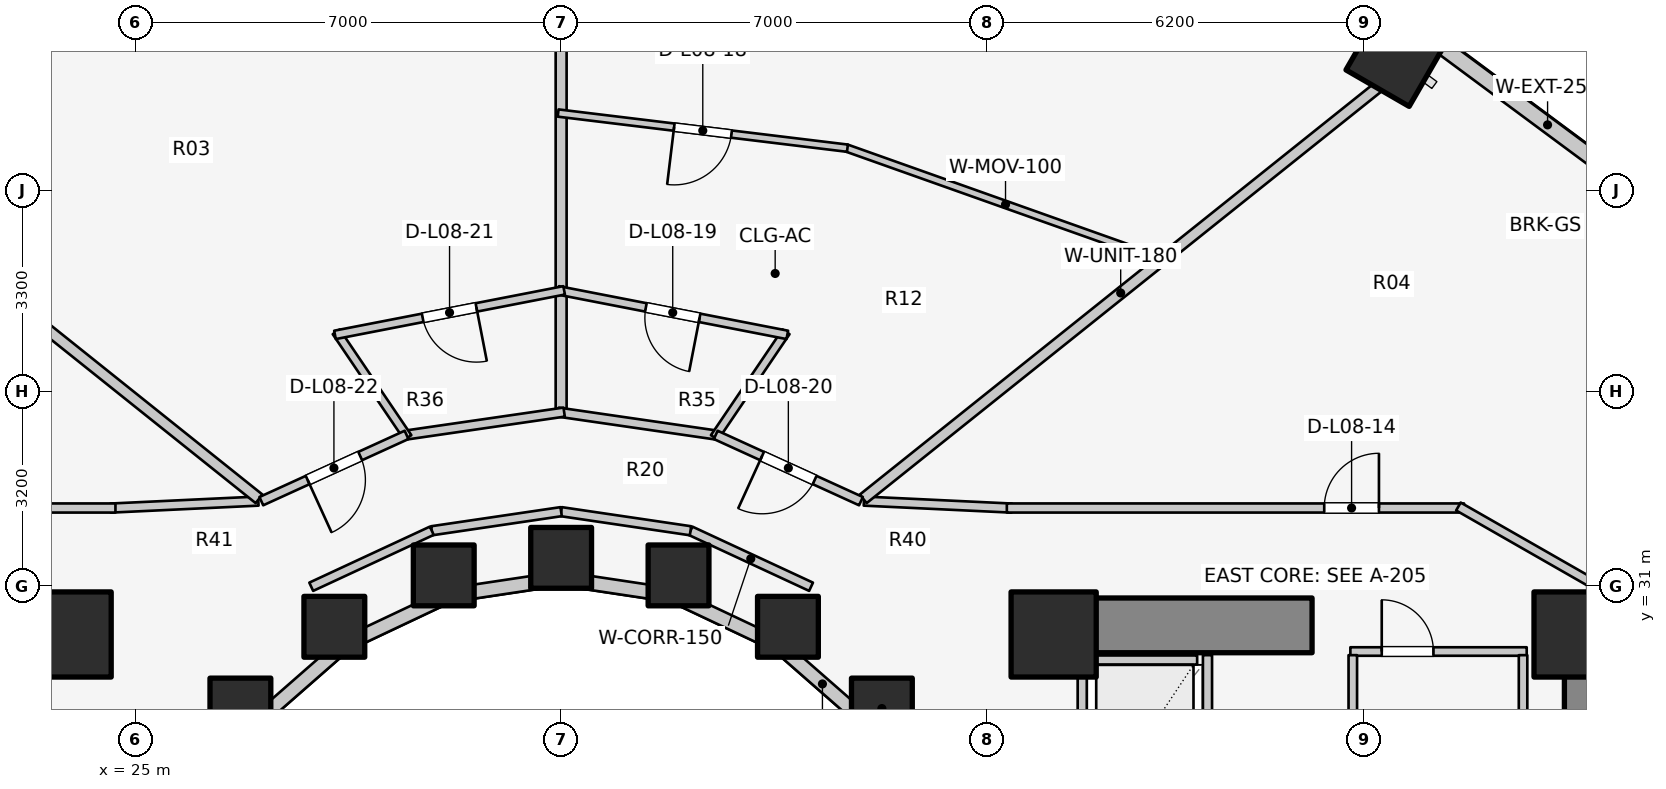
"""IFC4 building model, lengths in metres.
Left out: names, types, materials, properties, quantities, classifications, styles, units other than length and angle.
Written with IfcOpenShell. Run it as: python <this file> out.ifc"""

import sys

from ifc_helpers import new_model, si_unit, direction, frame, frame_2d, origin, origin_2d, place, context, subcontext, project, spatial, rectangle, extrude, element, fill, save


model = new_model("IFC4")
c1 = context("Model", 3, precision=1e-05, world=origin(), true_north=direction((0.0, 1.0)))
c2 = subcontext(c1, "Body", "Model", "MODEL_VIEW")
j1 = project(units=[si_unit("LENGTHUNIT", "METRE"), si_unit("PLANEANGLEUNIT", "RADIAN")], contexts=[c1])
p1 = place(None, origin())
s1 = spatial("IfcSite", under=j1, at=p1, CompositionType="ELEMENT")
p2 = place(p1, origin())
s2 = spatial("IfcBuilding", under=s1, at=p2, CompositionType="ELEMENT")
p3 = place(p2, frame((0.0, 0.0, 30.7)))
s3 = spatial("IfcBuildingStorey", under=s2, at=p3, CompositionType="ELEMENT", Elevation=30.7)
p4 = place(p3, frame((19.65, 30.35, 0.0), z_axis=(0.0, 0.0, 1.0), x_axis=(1.0, 0.0, 0.0)))
e1 = element("IfcWall", 1, at=p4, inside=s3, PredefinedType="SHEAR", context=c2, shape_type="SweptSolid", body=[
    extrude(rectangle(XDim=4.5, YDim=0.9, at=frame_2d((2.25, 0.0))), origin(), (0.0, 0.0, 1.0), 3.1),
])
p5 = place(p3, frame((48.95, 17.05, 0.0), z_axis=(0.0, 0.0, 1.0), x_axis=(0.0, 1.0, 0.0)))
e2 = element("IfcWall", 2, at=p5, inside=s3, PredefinedType="SHEAR", context=c2, shape_type="SweptSolid", body=[
    extrude(rectangle(XDim=12.8, YDim=0.9, at=frame_2d((6.4, 0.0))), origin(), (0.0, 0.0, 1.0), 3.1),
])
p6 = place(p3, frame((39.85, 30.35, 0.0), z_axis=(0.0, 0.0, 1.0), x_axis=(1.0, 0.0, 0.0)))
e3 = element("IfcWall", 3, at=p6, inside=s3, PredefinedType="SHEAR", context=c2, shape_type="SweptSolid", body=[
    extrude(rectangle(XDim=4.5, YDim=0.9, at=frame_2d((2.25, 0.0))), origin(), (0.0, 0.0, 1.0), 3.1),
])
for number, where, z_axis, x_axis in (
    (4, (23.9, 30.2, 0.0), (0.0, 0.0, 1.0), (1.0, 0.0, 0.0)),
    (5, (48.7, 30.2, 0.0), (0.0, 0.0, 1.0), (1.0, 0.0, 0.0)),
    (6, (40.1, 30.2, 0.0), (0.0, 0.0, 1.0), (1.0, 0.0, 0.0)),
):
    element("IfcColumn", number, at=place(p3, frame(where, z_axis=z_axis, x_axis=x_axis)), inside=s3, PredefinedType="COLUMN", context=c2, shape_type="SweptSolid", body=[
        extrude(rectangle(XDim=1.4, YDim=1.4, at=origin_2d()), origin(), (0.0, 0.0, 1.0), 3.1),
    ])
for number, where, z_axis, x_axis in (
    (7, (37.275, 28.982, 0.0), (0.0, 0.0, 1.0), (1.0, 0.0, 0.0)),
    (8, (35.73, 30.327, 0.0), (0.0, 0.0, 1.0), (1.0, 0.0, 0.0)),
):
    element("IfcColumn", number, at=place(p3, frame(where, z_axis=z_axis, x_axis=x_axis)), inside=s3, PredefinedType="COLUMN", context=c2, shape_type="SweptSolid", body=[
        extrude(rectangle(XDim=1.0, YDim=1.0, at=origin_2d()), origin(), (0.0, 0.0, 1.0), 3.1),
    ])
p7 = place(p3, frame((45.727, 39.704, 0.0), z_axis=(0.0, 0.0, 1.0), x_axis=(0.5, 0.866025403784, 0.0)))
e9 = element("IfcColumn", 9, at=p7, inside=s3, PredefinedType="COLUMN", context=c2, shape_type="SweptSolid", body=[
    extrude(rectangle(XDim=1.2, YDim=1.2, at=origin_2d()), origin(), (0.0, 0.0, 1.0), 3.1),
])
for number, where, z_axis, x_axis in (
    (10, (33.931, 31.172, 0.0), (0.0, 0.0, 1.0), (1.0, 0.0, 0.0)),
    (11, (32.0, 31.46, 0.0), (0.0, 0.0, 1.0), (1.0, 0.0, 0.0)),
    (12, (30.069, 31.172, 0.0), (0.0, 0.0, 1.0), (1.0, 0.0, 0.0)),
    (13, (28.27, 30.327, 0.0), (0.0, 0.0, 1.0), (1.0, 0.0, 0.0)),
    (14, (26.725, 28.982, 0.0), (0.0, 0.0, 1.0), (1.0, 0.0, 0.0)),
):
    element("IfcColumn", number, at=place(p3, frame(where, z_axis=z_axis, x_axis=x_axis)), inside=s3, PredefinedType="COLUMN", context=c2, shape_type="SweptSolid", body=[
        extrude(rectangle(XDim=1.0, YDim=1.0, at=origin_2d()), origin(), (0.0, 0.0, 1.0), 3.1),
    ])
p8 = place(p3, frame((37.035, 28.742, 0.0), z_axis=(0.0, 0.0, 1.0), x_axis=(-0.752576694707, 0.658504607869, 0.0)))
e15 = element("IfcWall", 15, at=p8, inside=s3, PredefinedType="STANDARD", context=c2, shape_type="SweptSolid", body=[
    extrude(rectangle(XDim=1.959, YDim=0.23, at=frame_2d((0.98, 0.0))), origin(), (0.0, 0.0, 1.0), 2.16),
])
p9 = place(p3, frame((35.56, 30.032, 0.0), z_axis=(0.0, 0.0, 1.0), x_axis=(-0.904179699603, 0.427152280606, 0.0)))
e16 = element("IfcWall", 16, at=p9, inside=s3, PredefinedType="STANDARD", context=c2, shape_type="SweptSolid", body=[
    extrude(rectangle(XDim=1.899, YDim=0.23, at=frame_2d((0.95, 0.0))), origin(), (0.0, 0.0, 1.0), 2.16),
])
for number, where, z_axis, x_axis in (
    (17, (33.843, 30.843, 0.0), (0.0, 0.0, 1.0), (-0.989, 0.149, 0.0)),
    (18, (32.0, 31.12, 0.0), (0.0, 0.0, 1.0), (-0.989, -0.149, 0.0)),
):
    element("IfcWall", number, at=place(p3, frame(where, z_axis=z_axis, x_axis=x_axis)), inside=s3, PredefinedType="STANDARD", context=c2, shape_type="SweptSolid", body=[
        extrude(rectangle(XDim=1.864, YDim=0.23, at=frame_2d((0.932, 0.0))), origin(), (0.0, 0.0, 1.0), 2.16),
    ])
p10 = place(p3, frame((30.157, 30.843, 0.0), z_axis=(0.0, 0.0, 1.0), x_axis=(-0.904179699603, -0.427152280606, 0.0)))
e19 = element("IfcWall", 19, at=p10, inside=s3, PredefinedType="STANDARD", context=c2, shape_type="SweptSolid", body=[
    extrude(rectangle(XDim=1.899, YDim=0.23, at=frame_2d((0.95, 0.0))), origin(), (0.0, 0.0, 1.0), 2.16),
])
p11 = place(p3, frame((28.44, 30.032, 0.0), z_axis=(0.0, 0.0, 1.0), x_axis=(-0.752576694707, -0.658504607869, 0.0)))
e20 = element("IfcWall", 20, at=p11, inside=s3, PredefinedType="STANDARD", context=c2, shape_type="SweptSolid", body=[
    extrude(rectangle(XDim=1.959, YDim=0.23, at=frame_2d((0.98, 0.0))), origin(), (0.0, 0.0, 1.0), 2.16),
])
p12 = place(p3, frame((50.405, 36.965, 0.0), z_axis=(0.0, 0.0, 1.0), x_axis=(-0.803477531792, 0.595335078679, 0.0)))
e21 = element("IfcWall", 21, at=p12, inside=s3, PredefinedType="STANDARD", context=c2, shape_type="SweptSolid", body=[
    extrude(rectangle(XDim=5.43, YDim=0.26, at=frame_2d((2.715, 0.0))), origin(), (0.0, 0.0, 1.0), 2.85),
])
p13 = place(p3, frame((40.74, 29.78, 0.0), z_axis=(0.0, 0.0, 1.0), x_axis=(1.0, 0.0, 0.0)))
e22 = element("IfcWall", 22, at=p13, inside=s3, PredefinedType="SOLIDWALL", context=c2, shape_type="SweptSolid", body=[
    extrude(rectangle(XDim=1.72, YDim=0.15, at=frame_2d((0.86, 0.0))), origin(), (0.0, 0.0, 1.0), 2.855),
])
for number, where, z_axis, x_axis in (
    (23, (40.57, 27.14, 0.0), (0.0, 0.0, 1.0), (0.0, 1.0, 0.0)),
    (24, (42.63, 27.14, 0.0), (0.0, 0.0, 1.0), (0.0, 1.0, 0.0)),
):
    element("IfcWall", number, at=place(p3, frame(where, z_axis=z_axis, x_axis=x_axis)), inside=s3, PredefinedType="SOLIDWALL", context=c2, shape_type="SweptSolid", body=[
        extrude(rectangle(XDim=2.72, YDim=0.15, at=frame_2d((1.36, 0.0))), origin(), (0.0, 0.0, 1.0), 2.855),
    ])
p14 = place(p3, frame((44.98, 29.92, 0.0), z_axis=(0.0, 0.0, 1.0), x_axis=(1.0, 0.0, 0.0)))
e25 = element("IfcWall", 25, at=p14, inside=s3, PredefinedType="PLUMBINGWALL", context=c2, shape_type="SweptSolid", body=[
    extrude(rectangle(XDim=2.9, YDim=0.14, at=frame_2d((1.45, 0.0))), origin(), (0.0, 0.0, 1.0), 2.855),
])
p15 = place(p14, frame((0.516, 0.0, 0.0)))
e26 = element("IfcOpeningElement", 26, at=p15, cuts=e25, PredefinedType="OPENING", context=c2, shape_type="SweptSolid", body=[
    extrude(rectangle(XDim=0.85, YDim=2.05, at=frame_2d((0.425, 1.025))), frame((0.0, 0.08, 0.0), z_axis=(0.0, -1.0, 0.0), x_axis=(1.0, 0.0, 0.0)), (0.0, 0.0, 1.0), 0.16),
])
for number, where, z_axis, x_axis in (
    (27, (45.02, 25.98, 0.0), (0.0, 0.0, 1.0), (0.0, 1.0, 0.0)),
    (28, (47.82, 25.98, 0.0), (0.0, 0.0, 1.0), (0.0, 1.0, 0.0)),
):
    element("IfcWall", number, at=place(p3, frame(where, z_axis=z_axis, x_axis=x_axis)), inside=s3, PredefinedType="PLUMBINGWALL", context=c2, shape_type="SweptSolid", body=[
        extrude(rectangle(XDim=3.88, YDim=0.14, at=frame_2d((1.94, 0.0))), origin(), (0.0, 0.0, 1.0), 2.855),
    ])
p16 = place(p3, frame((36.11, 30.985, 0.0), z_axis=(0.0, 0.0, 1.0), x_axis=(-0.906943449489, 0.421252393975, 0.0)))
e29 = element("IfcWall", 29, at=p16, inside=s3, PredefinedType="PARTITIONING", context=c2, shape_type="SweptSolid", body=[
    extrude(rectangle(XDim=2.186, YDim=0.15, at=frame_2d((1.093, 0.0))), origin(), (0.0, 0.0, 1.0), 2.237),
])
for number, where, z_axis, x_axis in (
    (30, (34.127, 31.906, 0.0), (0.0, 0.0, 1.0), (-0.989, 0.146, 0.0)),
    (31, (32.0, 32.22, 0.0), (0.0, 0.0, 1.0), (-0.989, -0.146, 0.0)),
):
    element("IfcWall", number, at=place(p3, frame(where, z_axis=z_axis, x_axis=x_axis)), inside=s3, PredefinedType="PARTITIONING", context=c2, shape_type="SweptSolid", body=[
        extrude(rectangle(XDim=2.151, YDim=0.15, at=frame_2d((1.075, 0.0))), origin(), (0.0, 0.0, 1.0), 2.237),
    ])
p17 = place(p3, frame((29.873, 31.906, 0.0), z_axis=(0.0, 0.0, 1.0), x_axis=(-0.906943449489, -0.421252393975, 0.0)))
e32 = element("IfcWall", 32, at=p17, inside=s3, PredefinedType="PARTITIONING", context=c2, shape_type="SweptSolid", body=[
    extrude(rectangle(XDim=2.186, YDim=0.15, at=frame_2d((1.093, 0.0))), origin(), (0.0, 0.0, 1.0), 2.237),
])
p18 = place(p3, frame((36.98, 32.394, 0.0), z_axis=(0.0, 0.0, 1.0), x_axis=(0.998877427952, -0.047369651964, 0.0)))
e33 = element("IfcWall", 33, at=p18, inside=s3, PredefinedType="PARTITIONING", context=c2, shape_type="SweptSolid", body=[
    extrude(rectangle(XDim=2.433, YDim=0.15, at=frame_2d((1.216, 0.0))), origin(), (0.0, 0.0, 1.0), 2.237),
])
p19 = place(p3, frame((39.33, 32.28, 0.0), z_axis=(0.0, 0.0, 1.0), x_axis=(1.0, 0.0, 0.0)))
e34 = element("IfcWall", 34, at=p19, inside=s3, PredefinedType="PARTITIONING", context=c2, shape_type="SweptSolid", body=[
    extrude(rectangle(XDim=7.52, YDim=0.15, at=frame_2d((3.76, 0.0))), origin(), (0.0, 0.0, 1.0), 2.237),
])
p20 = place(p19, frame((5.22, 0.0, 0.0)))
e35 = element("IfcOpeningElement", 35, at=p20, cuts=e34, PredefinedType="OPENING", context=c2, shape_type="SweptSolid", body=[
    extrude(rectangle(XDim=0.9, YDim=2.1, at=frame_2d((0.45, 1.05))), frame((0.0, 0.085, 0.0), z_axis=(0.0, -1.0, 0.0), x_axis=(1.0, 0.0, 0.0)), (0.0, 0.0, 1.0), 0.17),
])
p21 = place(p3, frame((46.757, 32.305, 0.0), z_axis=(0.0, 0.0, 1.0), x_axis=(0.867991349648, -0.496579315857, 0.0)))
e36 = element("IfcWall", 36, at=p21, inside=s3, PredefinedType="PARTITIONING", context=c2, shape_type="SweptSolid", body=[
    extrude(rectangle(XDim=2.567, YDim=0.15, at=frame_2d((1.283, 0.0))), origin(), (0.0, 0.0, 1.0), 2.069),
])
p22 = place(p3, frame((27.02, 32.394, 0.0), z_axis=(0.0, 0.0, 1.0), x_axis=(-0.998877427952, -0.047369651964, 0.0)))
e37 = element("IfcWall", 37, at=p22, inside=s3, PredefinedType="PARTITIONING", context=c2, shape_type="SweptSolid", body=[
    extrude(rectangle(XDim=2.433, YDim=0.15, at=frame_2d((1.216, 0.0))), origin(), (0.0, 0.0, 1.0), 2.237),
])
p23 = place(p3, frame((17.15, 32.28, 0.0), z_axis=(0.0, 0.0, 1.0), x_axis=(1.0, 0.0, 0.0)))
e38 = element("IfcWall", 38, at=p23, inside=s3, PredefinedType="PARTITIONING", context=c2, shape_type="SweptSolid", body=[
    extrude(rectangle(XDim=7.52, YDim=0.15, at=frame_2d((3.76, 0.0))), origin(), (0.0, 0.0, 1.0), 2.237),
])
p24 = place(p23, frame((1.3, 0.0, 0.0)))
e39 = element("IfcOpeningElement", 39, at=p24, cuts=e38, PredefinedType="OPENING", context=c2, shape_type="SweptSolid", body=[
    extrude(rectangle(XDim=0.9, YDim=2.1, at=frame_2d((0.45, 1.05))), frame((0.0, 0.085, 0.0), z_axis=(0.0, -1.0, 0.0), x_axis=(1.0, 0.0, 0.0)), (0.0, 0.0, 1.0), 0.17),
])
p25 = place(p3, frame((36.968, 32.431, 0.0), z_axis=(0.0, 0.0, 1.0), x_axis=(0.781055486744, 0.624461629428, 0.0)))
e40 = element("IfcWall", 40, at=p25, inside=s3, PredefinedType="PARTITIONING", context=c2, shape_type="SweptSolid", body=[
    extrude(rectangle(XDim=10.843, YDim=0.18, at=frame_2d((5.422, 0.0))), origin(), (0.0, 0.0, 1.0), 2.237),
])
p26 = place(p3, frame((32.0, 33.905, 0.0), z_axis=(0.0, 0.0, 1.0), x_axis=(0.0, 1.0, 0.0)))
e41 = element("IfcWall", 41, at=p26, inside=s3, PredefinedType="PARTITIONING", context=c2, shape_type="SweptSolid", body=[
    extrude(rectangle(XDim=8.395, YDim=0.18, at=frame_2d((4.198, 0.0))), origin(), (0.0, 0.0, 1.0), 2.237),
])
p27 = place(p3, frame((27.032, 32.431, 0.0), z_axis=(0.0, 0.0, 1.0), x_axis=(-0.781055486744, 0.624461629428, 0.0)))
e42 = element("IfcWall", 42, at=p27, inside=s3, PredefinedType="PARTITIONING", context=c2, shape_type="SweptSolid", body=[
    extrude(rectangle(XDim=10.843, YDim=0.18, at=frame_2d((5.422, 0.0))), origin(), (0.0, 0.0, 1.0), 2.237),
])
p28 = place(p3, frame((41.928, 36.342, 0.0), z_axis=(0.0, 0.0, 1.0), x_axis=(-0.942369240096, 0.334574678243, 0.0)))
e43 = element("IfcWall", 43, at=p28, inside=s3, PredefinedType="MOVABLE", context=c2, shape_type="SweptSolid", body=[
    extrude(rectangle(XDim=5.559, YDim=0.12, at=frame_2d((2.779, 0.0))), origin(), (0.0, 0.0, 1.0), 2.237),
])
p29 = place(p3, frame((36.708, 38.197, 0.0), z_axis=(0.0, 0.0, 1.0), x_axis=(-0.992699076447, 0.120617343785, 0.0)))
e44 = element("IfcWall", 44, at=p29, inside=s3, PredefinedType="MOVABLE", context=c2, shape_type="SweptSolid", body=[
    extrude(rectangle(XDim=4.793, YDim=0.12, at=frame_2d((2.396, 0.0))), origin(), (0.0, 0.0, 1.0), 2.237),
])
p30 = place(p29, frame((1.922, 0.0, 0.0)))
e45 = element("IfcOpeningElement", 45, at=p30, cuts=e44, PredefinedType="OPENING", context=c2, shape_type="SweptSolid", body=[
    extrude(rectangle(XDim=0.95, YDim=2.1, at=frame_2d((0.475, 1.05))), frame((0.0, 0.07, 0.0), z_axis=(0.0, -1.0, 0.0), x_axis=(1.0, 0.0, 0.0)), (0.0, 0.0, 1.0), 0.14),
])
p31 = place(p3, frame((34.599, 33.473, 0.0), z_axis=(0.0, 0.0, 1.0), x_axis=(-0.989649898776, 0.143502884474, 0.0)))
e46 = element("IfcWall", 46, at=p31, inside=s3, PredefinedType="PARTITIONING", context=c2, shape_type="SweptSolid", body=[
    extrude(rectangle(XDim=2.676, YDim=0.15, at=frame_2d((1.338, 0.0))), origin(), (0.0, 0.0, 1.0), 2.237),
])
p32 = place(p3, frame((34.521, 33.439, 0.0), z_axis=(0.0, 0.0, 1.0), x_axis=(0.56056273171, 0.828111963335, 0.0)))
e47 = element("IfcWall", 47, at=p32, inside=s3, PredefinedType="PLUMBINGWALL", context=c2, shape_type="SweptSolid", body=[
    extrude(rectangle(XDim=2.1, YDim=0.14, at=frame_2d((1.05, 0.0))), origin(), (0.0, 0.0, 1.0), 2.855),
])
p33 = place(p3, frame((35.72, 35.127, 0.0), z_axis=(0.0, 0.0, 1.0), x_axis=(-0.981623000654, 0.190830512727, 0.0)))
e48 = element("IfcWall", 48, at=p33, inside=s3, PredefinedType="PLUMBINGWALL", context=c2, shape_type="SweptSolid", body=[
    extrude(rectangle(XDim=3.839, YDim=0.14, at=frame_2d((1.92, 0.0))), origin(), (0.0, 0.0, 1.0), 2.237),
])
p34 = place(p33, frame((1.47, 0.0, 0.0)))
e49 = element("IfcOpeningElement", 49, at=p34, cuts=e48, PredefinedType="OPENING", context=c2, shape_type="SweptSolid", body=[
    extrude(rectangle(XDim=0.9, YDim=2.1, at=frame_2d((0.45, 1.05))), frame((0.0, 0.08, 0.0), z_axis=(0.0, -1.0, 0.0), x_axis=(1.0, 0.0, 0.0)), (0.0, 0.0, 1.0), 0.16),
])
p35 = place(p3, frame((36.931, 32.393, 0.0), z_axis=(0.0, 0.0, 1.0), x_axis=(-0.909747571199, 0.415161843982, 0.0)))
e50 = element("IfcWall", 50, at=p35, inside=s3, PredefinedType="PARTITIONING", context=c2, shape_type="SweptSolid", body=[
    extrude(rectangle(XDim=2.625, YDim=0.15, at=frame_2d((1.312, 0.0))), origin(), (0.0, 0.0, 1.0), 2.237),
])
p36 = place(p35, frame((0.838, 0.0, 0.0)))
e51 = element("IfcOpeningElement", 51, at=p36, cuts=e50, PredefinedType="OPENING", context=c2, shape_type="SweptSolid", body=[
    extrude(rectangle(XDim=0.95, YDim=2.1, at=frame_2d((0.475, 1.05))), frame((0.0, 0.085, 0.0), z_axis=(0.0, -1.0, 0.0), x_axis=(1.0, 0.0, 0.0)), (0.0, 0.0, 1.0), 0.17),
])
p37 = place(p3, frame((32.05, 33.857, 0.0), z_axis=(0.0, 0.0, 1.0), x_axis=(-0.989649898776, -0.143502884474, 0.0)))
e52 = element("IfcWall", 52, at=p37, inside=s3, PredefinedType="PARTITIONING", context=c2, shape_type="SweptSolid", body=[
    extrude(rectangle(XDim=2.676, YDim=0.15, at=frame_2d((1.338, 0.0))), origin(), (0.0, 0.0, 1.0), 2.237),
])
p38 = place(p3, frame((29.479, 33.439, 0.0), z_axis=(0.0, 0.0, 1.0), x_axis=(-0.56056273171, 0.828111963335, 0.0)))
e53 = element("IfcWall", 53, at=p38, inside=s3, PredefinedType="PLUMBINGWALL", context=c2, shape_type="SweptSolid", body=[
    extrude(rectangle(XDim=2.1, YDim=0.14, at=frame_2d((1.05, 0.0))), origin(), (0.0, 0.0, 1.0), 2.855),
])
p39 = place(p3, frame((32.049, 35.86, 0.0), z_axis=(0.0, 0.0, 1.0), x_axis=(-0.981623000654, -0.190830512727, 0.0)))
e54 = element("IfcWall", 54, at=p39, inside=s3, PredefinedType="PLUMBINGWALL", context=c2, shape_type="SweptSolid", body=[
    extrude(rectangle(XDim=3.839, YDim=0.14, at=frame_2d((1.92, 0.0))), origin(), (0.0, 0.0, 1.0), 2.237),
])
p40 = place(p39, frame((1.47, 0.0, 0.0)))
e55 = element("IfcOpeningElement", 55, at=p40, cuts=e54, PredefinedType="OPENING", context=c2, shape_type="SweptSolid", body=[
    extrude(rectangle(XDim=0.9, YDim=2.1, at=frame_2d((0.45, 1.05))), frame((0.0, 0.08, 0.0), z_axis=(0.0, -1.0, 0.0), x_axis=(1.0, 0.0, 0.0)), (0.0, 0.0, 1.0), 0.16),
])
p41 = place(p3, frame((29.457, 33.482, 0.0), z_axis=(0.0, 0.0, 1.0), x_axis=(-0.909747571199, -0.415161843982, 0.0)))
e56 = element("IfcWall", 56, at=p41, inside=s3, PredefinedType="PARTITIONING", context=c2, shape_type="SweptSolid", body=[
    extrude(rectangle(XDim=2.625, YDim=0.15, at=frame_2d((1.312, 0.0))), origin(), (0.0, 0.0, 1.0), 2.237),
])
p42 = place(p41, frame((0.838, 0.0, 0.0)))
e57 = element("IfcOpeningElement", 57, at=p42, cuts=e56, PredefinedType="OPENING", context=c2, shape_type="SweptSolid", body=[
    extrude(rectangle(XDim=0.95, YDim=2.1, at=frame_2d((0.475, 1.05))), frame((0.0, 0.085, 0.0), z_axis=(0.0, -1.0, 0.0), x_axis=(1.0, 0.0, 0.0)), (0.0, 0.0, 1.0), 0.17),
])
p43 = place(p15, origin())
e58 = element("IfcDoor", 58, at=p43, inside=s3, OperationType="SINGLE_SWING_LEFT", PredefinedType="DOOR", context=c2, shape_type="SweptSolid", body=[
    extrude(rectangle(XDim=0.85, YDim=2.05, at=frame_2d((0.425, 1.025))), frame((0.0, 0.025, 0.0), z_axis=(0.0, -1.0, 0.0), x_axis=(1.0, 0.0, 0.0)), (0.0, 0.0, 1.0), 0.05),
])
fill(e26, e58)
p44 = place(p20, origin())
e59 = element("IfcDoor", 59, at=p44, inside=s3, OperationType="SINGLE_SWING_RIGHT", PredefinedType="DOOR", context=c2, shape_type="SweptSolid", body=[
    extrude(rectangle(XDim=0.9, YDim=2.1, at=frame_2d((0.45, 1.05))), frame((0.0, 0.025, 0.0), z_axis=(0.0, -1.0, 0.0), x_axis=(1.0, 0.0, 0.0)), (0.0, 0.0, 1.0), 0.05),
])
fill(e35, e59)
p45 = place(p30, origin())
e60 = element("IfcDoor", 60, at=p45, inside=s3, OperationType="SINGLE_SWING_RIGHT", PredefinedType="DOOR", context=c2, shape_type="SweptSolid", body=[
    extrude(rectangle(XDim=0.95, YDim=2.1, at=frame_2d((0.475, 1.05))), frame((0.0, 0.025, 0.0), z_axis=(0.0, -1.0, 0.0), x_axis=(1.0, 0.0, 0.0)), (0.0, 0.0, 1.0), 0.05),
])
fill(e45, e60)
p46 = place(p34, origin())
e61 = element("IfcDoor", 61, at=p46, inside=s3, OperationType="SINGLE_SWING_LEFT", PredefinedType="DOOR", context=c2, shape_type="SweptSolid", body=[
    extrude(rectangle(XDim=0.9, YDim=2.1, at=frame_2d((0.45, 1.05))), frame((0.0, 0.025, 0.0), z_axis=(0.0, -1.0, 0.0), x_axis=(1.0, 0.0, 0.0)), (0.0, 0.0, 1.0), 0.05),
])
fill(e49, e61)
p47 = place(p36, origin())
e62 = element("IfcDoor", 62, at=p47, inside=s3, OperationType="SINGLE_SWING_RIGHT", PredefinedType="DOOR", context=c2, shape_type="SweptSolid", body=[
    extrude(rectangle(XDim=0.95, YDim=2.1, at=frame_2d((0.475, 1.05))), frame((0.0, 0.025, 0.0), z_axis=(0.0, -1.0, 0.0), x_axis=(1.0, 0.0, 0.0)), (0.0, 0.0, 1.0), 0.05),
])
fill(e51, e62)
p48 = place(p40, origin())
e63 = element("IfcDoor", 63, at=p48, inside=s3, OperationType="SINGLE_SWING_LEFT", PredefinedType="DOOR", context=c2, shape_type="SweptSolid", body=[
    extrude(rectangle(XDim=0.9, YDim=2.1, at=frame_2d((0.45, 1.05))), frame((0.0, 0.025, 0.0), z_axis=(0.0, -1.0, 0.0), x_axis=(1.0, 0.0, 0.0)), (0.0, 0.0, 1.0), 0.05),
])
fill(e55, e63)
p49 = place(p42, origin())
e64 = element("IfcDoor", 64, at=p49, inside=s3, OperationType="SINGLE_SWING_RIGHT", PredefinedType="DOOR", context=c2, shape_type="SweptSolid", body=[
    extrude(rectangle(XDim=0.95, YDim=2.1, at=frame_2d((0.475, 1.05))), frame((0.0, 0.025, 0.0), z_axis=(0.0, -1.0, 0.0), x_axis=(1.0, 0.0, 0.0)), (0.0, 0.0, 1.0), 0.05),
])
fill(e57, e64)
save(model, sys.argv[1])
